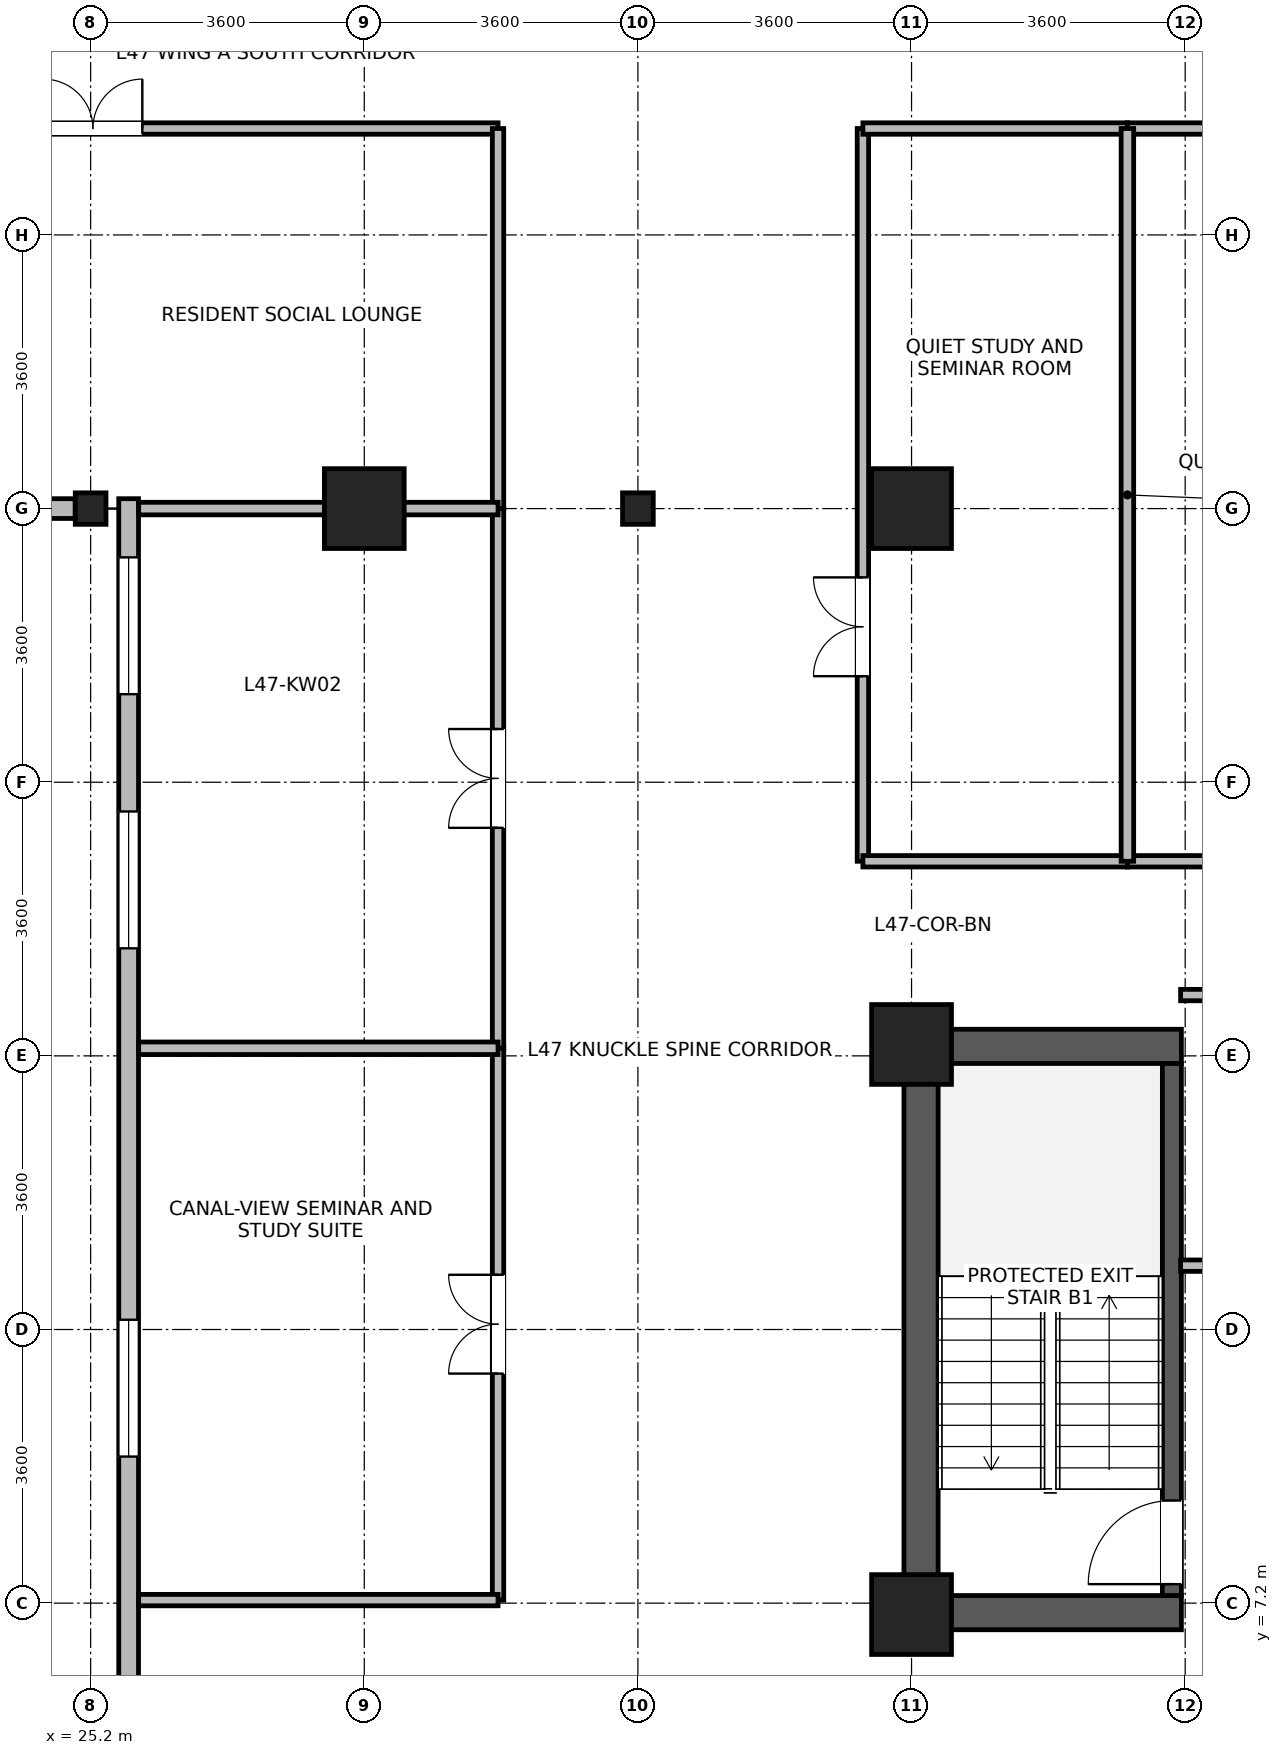
"""IFC4 building model, lengths in metres.
Left out: names, types, materials, properties, quantities, classifications, styles, units other than length and angle.
Written with IfcOpenShell. Run it as: python <this file> out.ifc"""

import sys

from ifc_helpers import new_model, si_unit, direction, frame, frame_2d, origin, origin_2d, place, context, subcontext, project, spatial, rectangle, i_section, extrude, source, transform, mapped, element, fill, save


model = new_model("IFC4")
c1 = context("Model", 3, precision=1e-05, world=origin(), true_north=direction((0.0, 1.0)))
c2 = subcontext(c1, "Body", "Model", "MODEL_VIEW")
j1 = project(units=[si_unit("LENGTHUNIT", "METRE"), si_unit("PLANEANGLEUNIT", "RADIAN")], contexts=[c1])
p1 = place(None, origin())
s1 = spatial("IfcSite", under=j1, at=p1, CompositionType="ELEMENT")
p2 = place(p1, origin())
s2 = spatial("IfcBuilding", under=s1, at=p2, CompositionType="ELEMENT")
p3 = place(p2, frame((0.0, 0.0, 184.6)))
s3 = spatial("IfcBuildingStorey", under=s2, at=p3, CompositionType="ELEMENT", Elevation=184.6)
p4 = place(p3, frame((36.125, 6.85, 0.0), z_axis=(0.0, 0.0, 1.0), x_axis=(0.0, 1.0, 0.0)))
e1 = element("IfcWall", 1, at=p4, inside=s3, PredefinedType="SHEAR", context=c2, shape_type="SweptSolid", body=[
    extrude(rectangle(XDim=7.9, YDim=0.45, at=frame_2d((3.95, 0.0))), origin(), (0.0, 0.0, 1.0), 3.46),
])
for number, where, z_axis, x_axis in (
    (2, (36.35, 7.075, 0.0), (0.0, 0.0, 1.0), (1.0, 0.0, 0.0)),
    (3, (36.35, 14.525, 0.0), (0.0, 0.0, 1.0), (1.0, 0.0, 0.0)),
):
    element("IfcWall", number, at=place(p3, frame(where, z_axis=z_axis, x_axis=x_axis)), inside=s3, PredefinedType="SHEAR", context=c2, shape_type="SweptSolid", body=[
        extrude(rectangle(XDim=3.2, YDim=0.45, at=frame_2d((1.6, 0.0))), origin(), (0.0, 0.0, 1.0), 3.46),
    ])
p5 = place(p3, frame((39.425, 7.3, 0.0), z_axis=(0.0, 0.0, 1.0), x_axis=(0.0, 1.0, 0.0)))
e4 = element("IfcWall", 4, at=p5, inside=s3, PredefinedType="SHEAR", context=c2, shape_type="SweptSolid", body=[
    extrude(rectangle(XDim=7.0, YDim=0.25, at=frame_2d((3.5, 0.0))), origin(), (0.0, 0.0, 1.0), 3.46),
])
p6 = place(p5, frame((0.15, 0.0, 0.0)))
e5 = element("IfcOpeningElement", 5, at=p6, cuts=e4, PredefinedType="OPENING", context=c2, shape_type="SweptSolid", body=[
    extrude(rectangle(XDim=1.1, YDim=2.08, at=frame_2d((0.55, 1.04))), frame((0.0, 0.135, 0.0), z_axis=(0.0, -1.0, 0.0), x_axis=(1.0, 0.0, 0.0)), (0.0, 0.0, 1.0), 0.27),
])
m1 = source(origin(), c2, "Body", "SweptSolid", [
    extrude(rectangle(XDim=1.05, YDim=1.05, at=origin_2d()), origin(), (0.0, 0.0, 1.0), 3.7),
])
for number, where, z_axis, x_axis in (
    (6, (28.8, 21.6, 0.0), (0.0, 0.0, 1.0), (1.0, 0.0, 0.0)),
    (7, (36.0, 21.6, 0.0), (0.0, 0.0, 1.0), (1.0, 0.0, 0.0)),
    (8, (36.0, 7.05, 0.0), (0.0, 0.0, 1.0), (1.0, 0.0, 0.0)),
    (9, (36.0, 14.55, 0.0), (0.0, 0.0, 1.0), (1.0, 0.0, 0.0)),
):
    element("IfcColumn", number, at=place(p3, frame(where, z_axis=z_axis, x_axis=x_axis)), inside=s3, PredefinedType="COLUMN", context=c2, shape_type="MappedRepresentation", body=[
        mapped(m1, transform((0.0, 0.0, 0.0), x_axis=(1.0, 0.0, 0.0), y_axis=(0.0, 1.0, 0.0), z_axis=(0.0, 0.0, 1.0), scale=1.0)),
    ])
m2 = source(origin(), c2, "Body", "SweptSolid", [
    extrude(i_section(OverallWidth=0.404, OverallDepth=0.414, WebThickness=0.021, FlangeThickness=0.028, FilletRadius=0.015, at=origin_2d()), origin(), (0.0, 0.0, 1.0), 3.7),
])
for number, where, z_axis, x_axis in (
    (10, (25.2, 21.6, 0.0), (0.0, 0.0, 1.0), (1.0, 0.0, 0.0)),
    (11, (32.4, 21.6, 0.0), (0.0, 0.0, 1.0), (1.0, 0.0, 0.0)),
):
    element("IfcColumn", number, at=place(p3, frame(where, z_axis=z_axis, x_axis=x_axis)), inside=s3, PredefinedType="COLUMN", context=c2, shape_type="MappedRepresentation", body=[
        mapped(m2, transform((0.0, 0.0, 0.0), x_axis=(1.0, 0.0, 0.0), y_axis=(0.0, 1.0, 0.0), z_axis=(0.0, 0.0, 1.0), scale=1.0)),
    ])
p7 = place(p3, frame((24.997, 21.6, 0.0), z_axis=(0.0, 0.0, 1.0), x_axis=(-1.0, 0.0, 0.0)))
e12 = element("IfcWall", 12, at=p7, inside=s3, PredefinedType="STANDARD", context=c2, shape_type="SweptSolid", body=[
    extrude(rectangle(XDim=2.871, YDim=0.26, at=frame_2d((1.436, 0.0))), origin(), (0.0, 0.0, 1.0), 2.99),
])
p8 = place(p7, frame((0.96, 0.0, 0.85)))
e13 = element("IfcOpeningElement", 13, at=p8, cuts=e12, PredefinedType="OPENING", context=c2, shape_type="SweptSolid", body=[
    extrude(rectangle(XDim=0.95, YDim=1.75, at=frame_2d((0.475, 0.875))), frame((0.0, 0.14, 0.0), z_axis=(0.0, -1.0, 0.0), x_axis=(1.0, 0.0, 0.0)), (0.0, 0.0, 1.0), 0.28),
])
p9 = place(p3, frame((25.7, 1.67, 0.0), z_axis=(0.0, 0.0, 1.0), x_axis=(0.0, 1.0, 0.0)))
e14 = element("IfcWall", 14, at=p9, inside=s3, PredefinedType="STANDARD", context=c2, shape_type="SweptSolid", body=[
    extrude(rectangle(XDim=20.06, YDim=0.26, at=frame_2d((10.03, 0.0))), origin(), (0.0, 0.0, 1.0), 3.44),
])
p10 = place(p9, frame((0.772, 0.0, 0.85)))
e15 = element("IfcOpeningElement", 15, at=p10, cuts=e14, PredefinedType="OPENING", context=c2, shape_type="SweptSolid", body=[
    extrude(rectangle(XDim=1.8, YDim=1.85, at=frame_2d((0.9, 0.925))), frame((0.0, 0.14, 0.0), z_axis=(0.0, -1.0, 0.0), x_axis=(1.0, 0.0, 0.0)), (0.0, 0.0, 1.0), 0.28),
])
p11 = place(p9, frame((7.458, 0.0, 0.85)))
e16 = element("IfcOpeningElement", 16, at=p11, cuts=e14, PredefinedType="OPENING", context=c2, shape_type="SweptSolid", body=[
    extrude(rectangle(XDim=1.8, YDim=1.85, at=frame_2d((0.9, 0.925))), frame((0.0, 0.14, 0.0), z_axis=(0.0, -1.0, 0.0), x_axis=(1.0, 0.0, 0.0)), (0.0, 0.0, 1.0), 0.28),
])
p12 = place(p9, frame((14.145, 0.0, 0.85)))
e17 = element("IfcOpeningElement", 17, at=p12, cuts=e14, PredefinedType="OPENING", context=c2, shape_type="SweptSolid", body=[
    extrude(rectangle(XDim=1.8, YDim=1.85, at=frame_2d((0.9, 0.925))), frame((0.0, 0.14, 0.0), z_axis=(0.0, -1.0, 0.0), x_axis=(1.0, 0.0, 0.0)), (0.0, 0.0, 1.0), 0.28),
])
p13 = place(p9, frame((17.488, 0.0, 0.85)))
e18 = element("IfcOpeningElement", 18, at=p13, cuts=e14, PredefinedType="OPENING", context=c2, shape_type="SweptSolid", body=[
    extrude(rectangle(XDim=1.8, YDim=1.85, at=frame_2d((0.9, 0.925))), frame((0.0, 0.14, 0.0), z_axis=(0.0, -1.0, 0.0), x_axis=(1.0, 0.0, 0.0)), (0.0, 0.0, 1.0), 0.28),
])
p14 = place(p3, frame((19.9, 26.6, 0.0), z_axis=(0.0, 0.0, 1.0), x_axis=(1.0, 0.0, 0.0)))
e19 = element("IfcWall", 19, at=p14, inside=s3, PredefinedType="PARTITIONING", context=c2, shape_type="SweptSolid", body=[
    extrude(rectangle(XDim=10.66, YDim=0.15, at=frame_2d((5.33, 0.0))), origin(), (0.0, 0.0, 1.0), 3.44),
])
p15 = place(p14, frame((4.68, 0.0, 0.0)))
e20 = element("IfcOpeningElement", 20, at=p15, cuts=e19, PredefinedType="OPENING", context=c2, shape_type="SweptSolid", body=[
    extrude(rectangle(XDim=1.3, YDim=2.12, at=frame_2d((0.65, 1.06))), frame((0.0, 0.085, 0.0), z_axis=(0.0, -1.0, 0.0), x_axis=(1.0, 0.0, 0.0)), (0.0, 0.0, 1.0), 0.17),
])
p16 = place(p3, frame((35.36, 16.96, 0.0), z_axis=(0.0, 0.0, 1.0), x_axis=(0.0, 1.0, 0.0)))
e21 = element("IfcWall", 21, at=p16, inside=s3, PredefinedType="PARTITIONING", context=c2, shape_type="SweptSolid", body=[
    extrude(rectangle(XDim=9.64, YDim=0.15, at=frame_2d((4.82, 0.0))), origin(), (0.0, 0.0, 1.0), 3.44),
])
p17 = place(p16, frame((2.435, 0.0, 0.0)))
e22 = element("IfcOpeningElement", 22, at=p17, cuts=e21, PredefinedType="OPENING", context=c2, shape_type="SweptSolid", body=[
    extrude(rectangle(XDim=1.3, YDim=2.12, at=frame_2d((0.65, 1.06))), frame((0.0, 0.085, 0.0), z_axis=(0.0, -1.0, 0.0), x_axis=(1.0, 0.0, 0.0)), (0.0, 0.0, 1.0), 0.17),
])
p18 = place(p3, frame((30.56, 7.24, 0.0), z_axis=(0.0, 0.0, 1.0), x_axis=(0.0, 1.0, 0.0)))
e23 = element("IfcWall", 23, at=p18, inside=s3, PredefinedType="PARTITIONING", context=c2, shape_type="SweptSolid", body=[
    extrude(rectangle(XDim=7.26, YDim=0.15, at=frame_2d((3.63, 0.0))), origin(), (0.0, 0.0, 1.0), 3.44),
])
p19 = place(p18, frame((2.98, 0.0, 0.0)))
e24 = element("IfcOpeningElement", 24, at=p19, cuts=e23, PredefinedType="OPENING", context=c2, shape_type="SweptSolid", body=[
    extrude(rectangle(XDim=1.3, YDim=2.12, at=frame_2d((0.65, 1.06))), frame((0.0, 0.085, 0.0), z_axis=(0.0, -1.0, 0.0), x_axis=(1.0, 0.0, 0.0)), (0.0, 0.0, 1.0), 0.17),
])
p20 = place(p3, frame((30.56, 14.5, 0.0), z_axis=(0.0, 0.0, 1.0), x_axis=(0.0, 1.0, 0.0)))
e25 = element("IfcWall", 25, at=p20, inside=s3, PredefinedType="PARTITIONING", context=c2, shape_type="SweptSolid", body=[
    extrude(rectangle(XDim=7.1, YDim=0.15, at=frame_2d((3.55, 0.0))), origin(), (0.0, 0.0, 1.0), 3.44),
])
p21 = place(p20, frame((2.9, 0.0, 0.0)))
e26 = element("IfcOpeningElement", 26, at=p21, cuts=e25, PredefinedType="OPENING", context=c2, shape_type="SweptSolid", body=[
    extrude(rectangle(XDim=1.3, YDim=2.12, at=frame_2d((0.65, 1.06))), frame((0.0, 0.085, 0.0), z_axis=(0.0, -1.0, 0.0), x_axis=(1.0, 0.0, 0.0)), (0.0, 0.0, 1.0), 0.17),
])
p22 = place(p3, frame((30.56, 21.6, 0.0), z_axis=(0.0, 0.0, 1.0), x_axis=(0.0, 1.0, 0.0)))
e27 = element("IfcWall", 27, at=p22, inside=s3, PredefinedType="PARTITIONING", context=c2, shape_type="SweptSolid", body=[
    extrude(rectangle(XDim=5.0, YDim=0.15, at=frame_2d((2.5, 0.0))), origin(), (0.0, 0.0, 1.0), 3.44),
])
p23 = place(p3, frame((38.84, 16.96, 0.0), z_axis=(0.0, 0.0, 1.0), x_axis=(1.0, 0.0, 0.0)))
e28 = element("IfcWall", 28, at=p23, inside=s3, PredefinedType="PARTITIONING", context=c2, shape_type="SweptSolid", body=[
    extrude(rectangle(XDim=4.92, YDim=0.15, at=frame_2d((2.46, 0.0))), origin(), (0.0, 0.0, 1.0), 3.44),
])
p24 = place(p23, frame((1.81, 0.0, 0.0)))
e29 = element("IfcOpeningElement", 29, at=p24, cuts=e28, PredefinedType="OPENING", context=c2, shape_type="SweptSolid", body=[
    extrude(rectangle(XDim=1.3, YDim=2.12, at=frame_2d((0.65, 1.06))), frame((0.0, 0.085, 0.0), z_axis=(0.0, -1.0, 0.0), x_axis=(1.0, 0.0, 0.0)), (0.0, 0.0, 1.0), 0.17),
])
p25 = place(p3, frame((38.84, 26.6, 0.0), z_axis=(0.0, 0.0, 1.0), x_axis=(1.0, 0.0, 0.0)))
e30 = element("IfcWall", 30, at=p25, inside=s3, PredefinedType="PARTITIONING", context=c2, shape_type="SweptSolid", body=[
    extrude(rectangle(XDim=4.92, YDim=0.15, at=frame_2d((2.46, 0.0))), origin(), (0.0, 0.0, 1.0), 3.44),
])
p26 = place(p3, frame((25.832, 7.24, 0.0), z_axis=(0.0, 0.0, 1.0), x_axis=(1.0, 0.0, 0.0)))
e31 = element("IfcWall", 31, at=p26, inside=s3, PredefinedType="PARTITIONING", context=c2, shape_type="SweptSolid", body=[
    extrude(rectangle(XDim=4.728, YDim=0.15, at=frame_2d((2.364, 0.0))), origin(), (0.0, 0.0, 1.0), 3.44),
])
for number, where, z_axis, x_axis in (
    (32, (35.36, 16.96, 0.0), (0.0, 0.0, 1.0), (1.0, 0.0, 0.0)),
    (33, (35.36, 26.6, 0.0), (0.0, 0.0, 1.0), (1.0, 0.0, 0.0)),
):
    element("IfcWall", number, at=place(p3, frame(where, z_axis=z_axis, x_axis=x_axis)), inside=s3, PredefinedType="PARTITIONING", context=c2, shape_type="SweptSolid", body=[
        extrude(rectangle(XDim=3.48, YDim=0.15, at=frame_2d((1.74, 0.0))), origin(), (0.0, 0.0, 1.0), 3.44),
    ])
p27 = place(p3, frame((39.54, 11.64, 0.0), z_axis=(0.0, 0.0, 1.0), x_axis=(1.0, 0.0, 0.0)))
e34 = element("IfcWall", 34, at=p27, inside=s3, PredefinedType="PARTITIONING", context=c2, shape_type="SweptSolid", body=[
    extrude(rectangle(XDim=2.76, YDim=0.15, at=frame_2d((1.38, 0.0))), origin(), (0.0, 0.0, 1.0), 3.44),
])
p28 = place(p27, frame((0.73, 0.0, 0.0)))
e35 = element("IfcOpeningElement", 35, at=p28, cuts=e34, PredefinedType="OPENING", context=c2, shape_type="SweptSolid", body=[
    extrude(rectangle(XDim=1.3, YDim=2.12, at=frame_2d((0.65, 1.06))), frame((0.0, 0.085, 0.0), z_axis=(0.0, -1.0, 0.0), x_axis=(1.0, 0.0, 0.0)), (0.0, 0.0, 1.0), 0.17),
])
p29 = place(p3, frame((39.54, 15.2, 0.0), z_axis=(0.0, 0.0, 1.0), x_axis=(1.0, 0.0, 0.0)))
e36 = element("IfcWall", 36, at=p29, inside=s3, PredefinedType="PARTITIONING", context=c2, shape_type="SweptSolid", body=[
    extrude(rectangle(XDim=2.76, YDim=0.15, at=frame_2d((1.38, 0.0))), origin(), (0.0, 0.0, 1.0), 3.44),
])
p30 = place(p3, frame((38.84, 16.96, 0.0), z_axis=(0.0, 0.0, 1.0), x_axis=(0.0, 1.0, 0.0)))
e37 = element("IfcWall", 37, at=p30, inside=s3, PredefinedType="PARTITIONING", context=c2, shape_type="SweptSolid", body=[
    extrude(rectangle(XDim=9.64, YDim=0.165, at=frame_2d((4.82, 0.0))), origin(), (0.0, 0.0, 1.0), 3.44),
])
p31 = place(p3, frame((25.832, 14.5, 0.0), z_axis=(0.0, 0.0, 1.0), x_axis=(1.0, 0.0, 0.0)))
e38 = element("IfcWall", 38, at=p31, inside=s3, PredefinedType="PARTITIONING", context=c2, shape_type="SweptSolid", body=[
    extrude(rectangle(XDim=4.728, YDim=0.165, at=frame_2d((2.364, 0.0))), origin(), (0.0, 0.0, 1.0), 3.44),
])
p32 = place(p3, frame((25.832, 21.6, 0.0), z_axis=(0.0, 0.0, 1.0), x_axis=(1.0, 0.0, 0.0)))
e39 = element("IfcWall", 39, at=p32, inside=s3, PredefinedType="PARTITIONING", context=c2, shape_type="SweptSolid", body=[
    extrude(rectangle(XDim=4.728, YDim=0.165, at=frame_2d((2.364, 0.0))), origin(), (0.0, 0.0, 1.0), 2.99),
])
p33 = place(p11, origin())
e40 = element("IfcWindow", 40, at=p33, inside=s3, PartitioningType="SINGLE_PANEL", PredefinedType="WINDOW", context=c2, shape_type="SweptSolid", body=[
    extrude(rectangle(XDim=1.8, YDim=1.85, at=frame_2d((0.9, 0.925))), frame((0.0, 0.03, 0.0), z_axis=(0.0, -1.0, 0.0), x_axis=(1.0, 0.0, 0.0)), (0.0, 0.0, 1.0), 0.06),
])
fill(e16, e40)
p34 = place(p12, origin())
e41 = element("IfcWindow", 41, at=p34, inside=s3, PartitioningType="SINGLE_PANEL", PredefinedType="WINDOW", context=c2, shape_type="SweptSolid", body=[
    extrude(rectangle(XDim=1.8, YDim=1.85, at=frame_2d((0.9, 0.925))), frame((0.0, 0.03, 0.0), z_axis=(0.0, -1.0, 0.0), x_axis=(1.0, 0.0, 0.0)), (0.0, 0.0, 1.0), 0.06),
])
fill(e17, e41)
p35 = place(p13, origin())
e42 = element("IfcWindow", 42, at=p35, inside=s3, PartitioningType="SINGLE_PANEL", PredefinedType="WINDOW", context=c2, shape_type="SweptSolid", body=[
    extrude(rectangle(XDim=1.8, YDim=1.85, at=frame_2d((0.9, 0.925))), frame((0.0, 0.03, 0.0), z_axis=(0.0, -1.0, 0.0), x_axis=(1.0, 0.0, 0.0)), (0.0, 0.0, 1.0), 0.06),
])
fill(e18, e42)
p36 = place(p6, origin())
e43 = element("IfcDoor", 43, at=p36, inside=s3, OperationType="SINGLE_SWING_LEFT", PredefinedType="DOOR", context=c2, shape_type="SweptSolid", body=[
    extrude(rectangle(XDim=1.1, YDim=2.08, at=frame_2d((0.55, 1.04))), frame((0.0, 0.025, 0.0), z_axis=(0.0, -1.0, 0.0), x_axis=(1.0, 0.0, 0.0)), (0.0, 0.0, 1.0), 0.05),
])
fill(e5, e43)
p37 = place(p15, origin())
e44 = element("IfcDoor", 44, at=p37, inside=s3, OperationType="DOUBLE_DOOR_SINGLE_SWING", PredefinedType="DOOR", context=c2, shape_type="SweptSolid", body=[
    extrude(rectangle(XDim=1.3, YDim=2.12, at=frame_2d((0.65, 1.06))), frame((0.0, 0.025, 0.0), z_axis=(0.0, -1.0, 0.0), x_axis=(1.0, 0.0, 0.0)), (0.0, 0.0, 1.0), 0.05),
])
fill(e20, e44)
p38 = place(p17, origin())
e45 = element("IfcDoor", 45, at=p38, inside=s3, OperationType="DOUBLE_DOOR_SINGLE_SWING", PredefinedType="DOOR", context=c2, shape_type="SweptSolid", body=[
    extrude(rectangle(XDim=1.3, YDim=2.12, at=frame_2d((0.65, 1.06))), frame((0.0, 0.025, 0.0), z_axis=(0.0, -1.0, 0.0), x_axis=(1.0, 0.0, 0.0)), (0.0, 0.0, 1.0), 0.05),
])
fill(e22, e45)
p39 = place(p19, origin())
e46 = element("IfcDoor", 46, at=p39, inside=s3, OperationType="DOUBLE_DOOR_SINGLE_SWING", PredefinedType="DOOR", context=c2, shape_type="SweptSolid", body=[
    extrude(rectangle(XDim=1.3, YDim=2.12, at=frame_2d((0.65, 1.06))), frame((0.0, 0.025, 0.0), z_axis=(0.0, -1.0, 0.0), x_axis=(1.0, 0.0, 0.0)), (0.0, 0.0, 1.0), 0.05),
])
fill(e24, e46)
p40 = place(p21, origin())
e47 = element("IfcDoor", 47, at=p40, inside=s3, OperationType="DOUBLE_DOOR_SINGLE_SWING", PredefinedType="DOOR", context=c2, shape_type="SweptSolid", body=[
    extrude(rectangle(XDim=1.3, YDim=2.12, at=frame_2d((0.65, 1.06))), frame((0.0, 0.025, 0.0), z_axis=(0.0, -1.0, 0.0), x_axis=(1.0, 0.0, 0.0)), (0.0, 0.0, 1.0), 0.05),
])
fill(e26, e47)
save(model, sys.argv[1])
